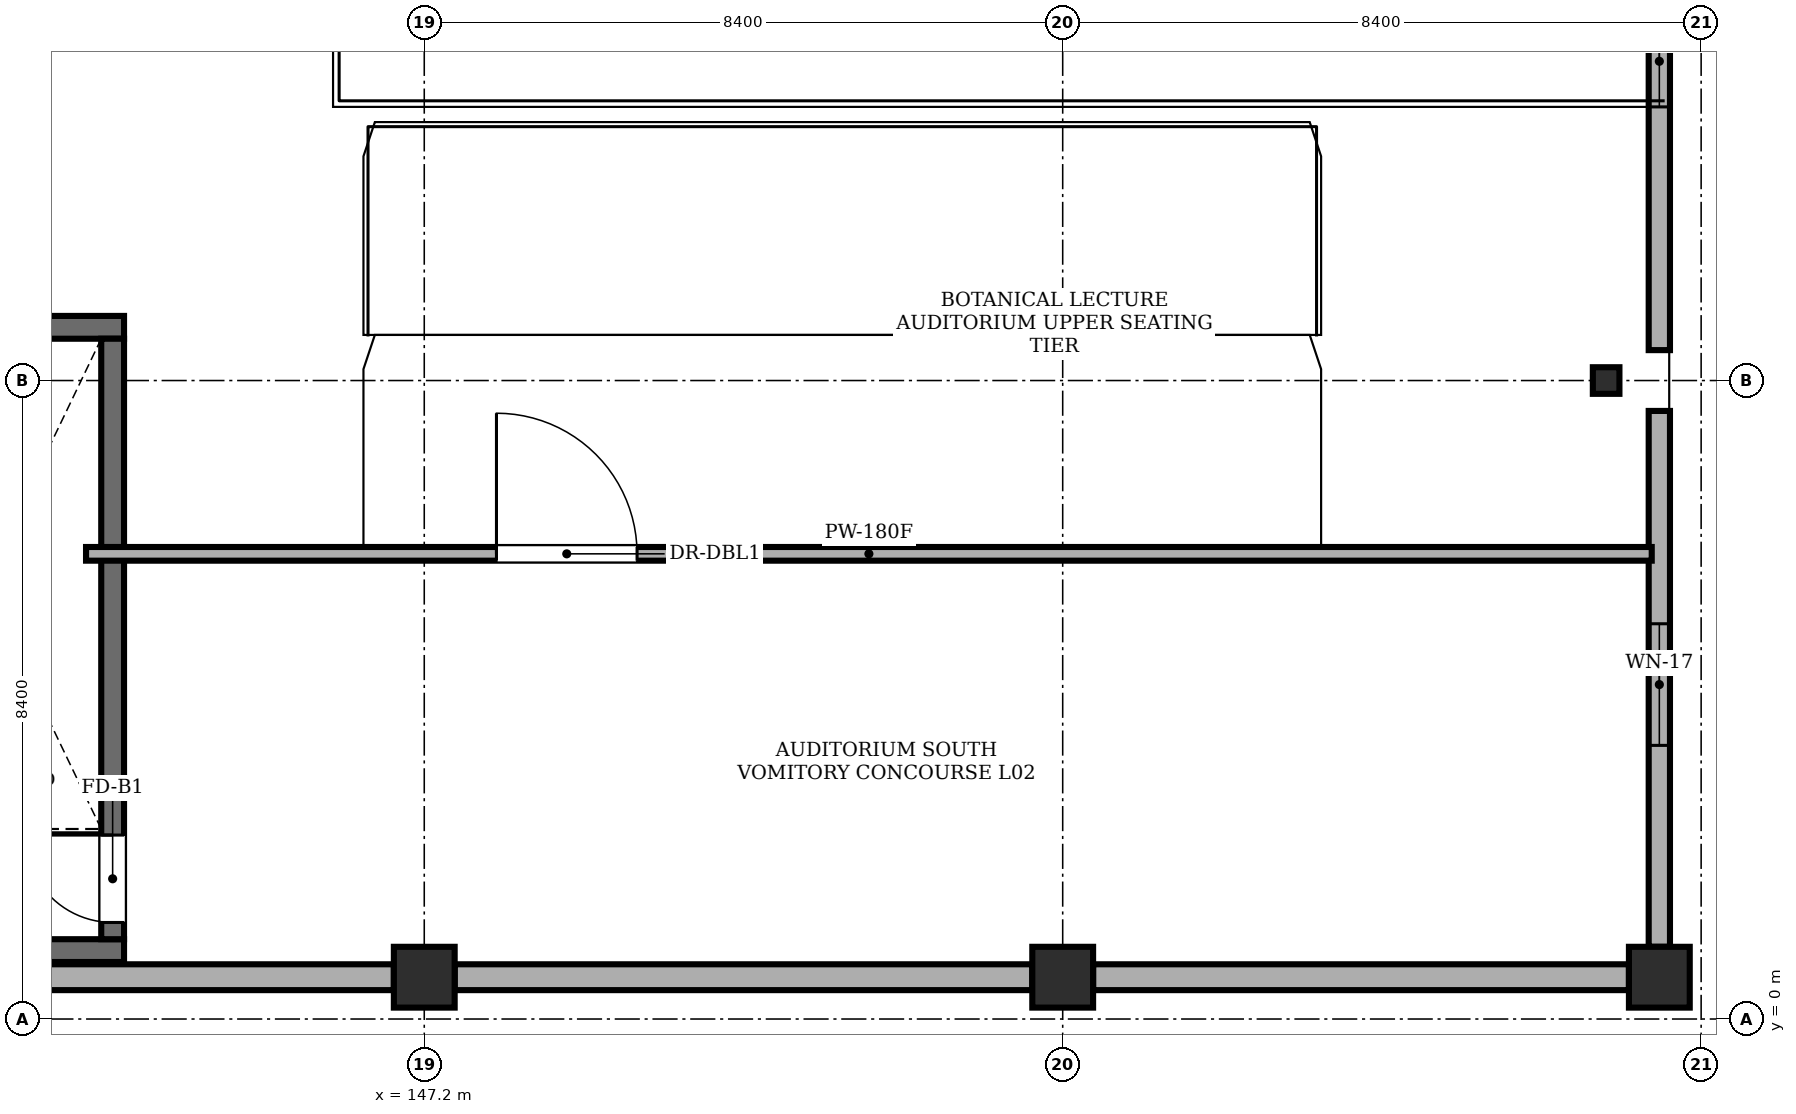
"""IFC4 building model, lengths in metres.
Left out: names, types, materials, properties, quantities, classifications, styles, units other than length and angle.
Written with IfcOpenShell. Run it as: python <this file> out.ifc"""

import sys

from ifc_helpers import new_model, si_unit, direction, frame, frame_2d, origin, origin_2d, place, context, subcontext, project, spatial, rectangle, i_section, extrude, element, fill, save


model = new_model("IFC4")
c1 = context("Model", 3, precision=1e-05, world=origin(), true_north=direction((0.0, 1.0)))
c2 = subcontext(c1, "Body", "Model", "MODEL_VIEW")
j1 = project(units=[si_unit("LENGTHUNIT", "METRE"), si_unit("PLANEANGLEUNIT", "RADIAN")], contexts=[c1])
p1 = place(None, origin())
s1 = spatial("IfcSite", under=j1, at=p1, CompositionType="ELEMENT")
p2 = place(p1, origin())
s2 = spatial("IfcBuilding", under=s1, at=p2, CompositionType="ELEMENT")
p3 = place(p2, frame((0.0, 0.0, 5.4)))
s3 = spatial("IfcBuildingStorey", under=s2, at=p3, CompositionType="ELEMENT", Elevation=5.4)
for number, where, z_axis, x_axis in (
    (1, (147.2, 0.55, 0.0), (0.0, 0.0, 1.0), (1.0, 0.0, 0.0)),
    (2, (155.6, 0.55, 0.0), (0.0, 0.0, 1.0), (1.0, 0.0, 0.0)),
    (3, (163.45, 0.55, 0.0), (0.0, 0.0, 1.0), (1.0, 0.0, 0.0)),
):
    element("IfcColumn", number, at=place(p3, frame(where, z_axis=z_axis, x_axis=x_axis)), inside=s3, PredefinedType="COLUMN", context=c2, shape_type="SweptSolid", body=[
        extrude(rectangle(XDim=0.8, YDim=0.8, at=origin_2d()), origin(), (0.0, 0.0, 1.0), 4.6),
    ])
p4 = place(p3, frame((139.2, 0.9, 0.0), z_axis=(0.0, 0.0, 1.0), x_axis=(1.0, 0.0, 0.0)))
e4 = element("IfcWall", 4, at=p4, inside=s3, PredefinedType="SHEAR", context=c2, shape_type="SweptSolid", body=[
    extrude(rectangle(XDim=4.05, YDim=0.3, at=frame_2d((2.025, 0.0))), origin(), (0.0, 0.0, 1.0), 4.6),
])
p5 = place(p3, frame((139.55, 9.1, 0.0), z_axis=(0.0, 0.0, 1.0), x_axis=(1.0, 0.0, 0.0)))
e5 = element("IfcWall", 5, at=p5, inside=s3, PredefinedType="SHEAR", context=c2, shape_type="SweptSolid", body=[
    extrude(rectangle(XDim=3.7, YDim=0.3, at=frame_2d((1.85, 0.0))), origin(), (0.0, 0.0, 1.0), 4.6),
])
p6 = place(p3, frame((143.1, 1.05, 0.0), z_axis=(0.0, 0.0, 1.0), x_axis=(0.0, 1.0, 0.0)))
e6 = element("IfcWall", 6, at=p6, inside=s3, PredefinedType="SHEAR", context=c2, shape_type="SweptSolid", body=[
    extrude(rectangle(XDim=7.9, YDim=0.3, at=frame_2d((3.95, 0.0))), origin(), (0.0, 0.0, 1.0), 4.6),
])
p7 = place(p6, frame((0.22, 0.0, 0.0)))
e7 = element("IfcOpeningElement", 7, at=p7, cuts=e6, PredefinedType="OPENING", context=c2, shape_type="SweptSolid", body=[
    extrude(rectangle(XDim=1.15, YDim=2.15, at=frame_2d((0.575, 1.075))), frame((0.0, 0.16, 0.0), z_axis=(0.0, -1.0, 0.0), x_axis=(1.0, 0.0, 0.0)), (0.0, 0.0, 1.0), 0.32),
])
p8 = place(p3, frame((162.75, 8.4, 0.0), z_axis=(0.0, 0.0, 1.0), x_axis=(1.0, 0.0, 0.0)))
e8 = element("IfcColumn", 8, at=p8, inside=s3, PredefinedType="COLUMN", context=c2, shape_type="SweptSolid", body=[
    extrude(i_section(OverallWidth=0.35, OverallDepth=0.35, WebThickness=0.012, FlangeThickness=0.019, at=origin_2d()), origin(), (0.0, 0.0, 1.0), 2.7),
])
p9 = place(p3, frame((163.45, 8.0, 0.0), z_axis=(0.0, 0.0, 1.0), x_axis=(0.0, -1.0, 0.0)))
e9 = element("IfcWall", 9, at=p9, inside=s3, PredefinedType="STANDARD", context=c2, shape_type="SweptSolid", body=[
    extrude(rectangle(XDim=7.05, YDim=0.28, at=frame_2d((3.525, 0.0))), origin(), (0.0, 0.0, 1.0), 4.6),
])
p10 = place(p9, frame((2.8, 0.0, 2.2)))
e10 = element("IfcOpeningElement", 10, at=p10, cuts=e9, PredefinedType="OPENING", context=c2, shape_type="SweptSolid", body=[
    extrude(rectangle(XDim=1.6, YDim=1.2, at=frame_2d((0.8, 0.6))), frame((0.0, 0.15, 0.0), z_axis=(0.0, -1.0, 0.0), x_axis=(1.0, 0.0, 0.0)), (0.0, 0.0, 1.0), 0.3),
])
p11 = place(p3, frame((163.45, 16.4, 0.0), z_axis=(0.0, 0.0, 1.0), x_axis=(0.0, -1.0, 0.0)))
e11 = element("IfcWall", 11, at=p11, inside=s3, PredefinedType="STANDARD", context=c2, shape_type="SweptSolid", body=[
    extrude(rectangle(XDim=7.6, YDim=0.28, at=frame_2d((3.8, 0.0))), origin(), (0.0, 0.0, 1.0), 4.6),
])
p12 = place(p11, frame((2.8, 0.0, 2.2)))
e12 = element("IfcOpeningElement", 12, at=p12, cuts=e11, PredefinedType="OPENING", context=c2, shape_type="SweptSolid", body=[
    extrude(rectangle(XDim=1.6, YDim=1.2, at=frame_2d((0.8, 0.6))), frame((0.0, 0.15, 0.0), z_axis=(0.0, -1.0, 0.0), x_axis=(1.0, 0.0, 0.0)), (0.0, 0.0, 1.0), 0.3),
])
p13 = place(p3, frame((146.8, 0.55, 0.0), z_axis=(0.0, 0.0, 1.0), x_axis=(-1.0, 0.0, 0.0)))
e13 = element("IfcWall", 13, at=p13, inside=s3, PredefinedType="STANDARD", context=c2, shape_type="SweptSolid", body=[
    extrude(rectangle(XDim=7.6, YDim=0.34, at=frame_2d((3.8, 0.0))), origin(), (0.0, 0.0, 1.0), 3.85),
])
p14 = place(p3, frame((155.2, 0.55, 0.0), z_axis=(0.0, 0.0, 1.0), x_axis=(-1.0, 0.0, 0.0)))
e14 = element("IfcWall", 14, at=p14, inside=s3, PredefinedType="STANDARD", context=c2, shape_type="SweptSolid", body=[
    extrude(rectangle(XDim=7.6, YDim=0.34, at=frame_2d((3.8, 0.0))), origin(), (0.0, 0.0, 1.0), 3.85),
])
p15 = place(p3, frame((163.05, 0.55, 0.0), z_axis=(0.0, 0.0, 1.0), x_axis=(-1.0, 0.0, 0.0)))
e15 = element("IfcWall", 15, at=p15, inside=s3, PredefinedType="STANDARD", context=c2, shape_type="SweptSolid", body=[
    extrude(rectangle(XDim=7.05, YDim=0.34, at=frame_2d((3.525, 0.0))), origin(), (0.0, 0.0, 1.0), 3.85),
])
p16 = place(p3, frame((142.75, 6.12, 0.0), z_axis=(0.0, 0.0, 1.0), x_axis=(1.0, 0.0, 0.0)))
e16 = element("IfcWall", 16, at=p16, inside=s3, PredefinedType="STANDARD", context=c2, shape_type="SweptSolid", body=[
    extrude(rectangle(XDim=20.6, YDim=0.18, at=frame_2d((10.3, 0.0))), origin(), (0.0, 0.0, 1.0), 4.58),
])
p17 = place(p16, frame((5.4, 0.0, 0.0)))
e17 = element("IfcOpeningElement", 17, at=p17, cuts=e16, PredefinedType="OPENING", context=c2, shape_type="SweptSolid", body=[
    extrude(rectangle(XDim=1.85, YDim=2.25, at=frame_2d((0.925, 1.125))), frame((0.0, 0.1, 0.0), z_axis=(0.0, -1.0, 0.0), x_axis=(1.0, 0.0, 0.0)), (0.0, 0.0, 1.0), 0.2),
])
p18 = place(p10, origin())
e18 = element("IfcWindow", 18, at=p18, inside=s3, PartitioningType="DOUBLE_PANEL_HORIZONTAL", PredefinedType="WINDOW", context=c2, shape_type="SweptSolid", body=[
    extrude(rectangle(XDim=1.6, YDim=1.2, at=frame_2d((0.8, 0.6))), frame((0.0, 0.03, 0.0), z_axis=(0.0, -1.0, 0.0), x_axis=(1.0, 0.0, 0.0)), (0.0, 0.0, 1.0), 0.06),
])
fill(e10, e18)
p19 = place(p12, origin())
e19 = element("IfcWindow", 19, at=p19, inside=s3, PartitioningType="DOUBLE_PANEL_HORIZONTAL", PredefinedType="WINDOW", context=c2, shape_type="SweptSolid", body=[
    extrude(rectangle(XDim=1.6, YDim=1.2, at=frame_2d((0.8, 0.6))), frame((0.0, 0.03, 0.0), z_axis=(0.0, -1.0, 0.0), x_axis=(1.0, 0.0, 0.0)), (0.0, 0.0, 1.0), 0.06),
])
fill(e12, e19)
p20 = place(p17, origin())
e20 = element("IfcDoor", 20, at=p20, inside=s3, OperationType="SINGLE_SWING_LEFT", PredefinedType="DOOR", context=c2, shape_type="SweptSolid", body=[
    extrude(rectangle(XDim=1.85, YDim=2.25, at=frame_2d((0.925, 1.125))), frame((0.0, 0.025, 0.0), z_axis=(0.0, -1.0, 0.0), x_axis=(1.0, 0.0, 0.0)), (0.0, 0.0, 1.0), 0.05),
])
fill(e17, e20)
p21 = place(p7, origin())
e21 = element("IfcDoor", 21, at=p21, inside=s3, OperationType="SINGLE_SWING_RIGHT", PredefinedType="DOOR", context=c2, shape_type="SweptSolid", body=[
    extrude(rectangle(XDim=1.15, YDim=2.15, at=frame_2d((0.575, 1.075))), frame((0.0, 0.025, 0.0), z_axis=(0.0, -1.0, 0.0), x_axis=(1.0, 0.0, 0.0)), (0.0, 0.0, 1.0), 0.05),
])
fill(e7, e21)
save(model, sys.argv[1])
